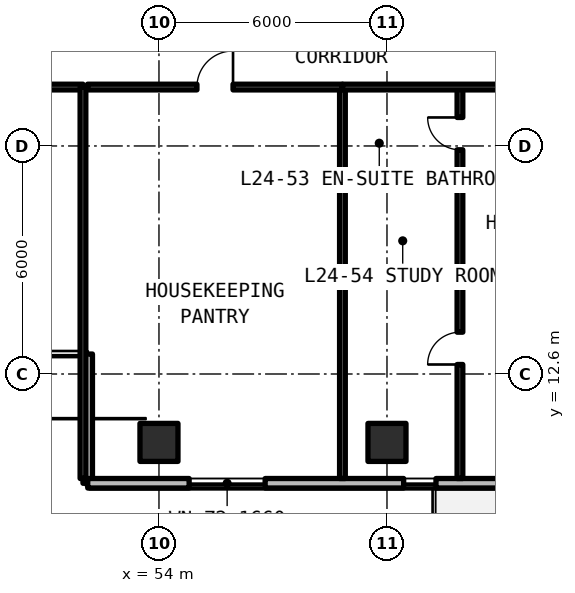
"""IFC4 building model, lengths in metres.
Left out: names, types, materials, properties, quantities, classifications, styles, units other than length and angle.
Written with IfcOpenShell. Run it as: python <this file> out.ifc"""

import sys

from ifc_helpers import new_model, si_unit, direction, frame, frame_2d, origin, origin_2d, place, context, subcontext, project, spatial, rectangle, extrude, element, fill, save


model = new_model("IFC4")
c1 = context("Model", 3, precision=1e-05, world=origin(), true_north=direction((0.0, 1.0)))
c2 = subcontext(c1, "Body", "Model", "MODEL_VIEW")
j1 = project(units=[si_unit("LENGTHUNIT", "METRE"), si_unit("PLANEANGLEUNIT", "RADIAN")], contexts=[c1])
p1 = place(None, origin())
s1 = spatial("IfcSite", under=j1, at=p1, CompositionType="ELEMENT")
p2 = place(p1, origin())
s2 = spatial("IfcBuilding", under=s1, at=p2, CompositionType="ELEMENT")
p3 = place(p2, frame((0.0, 0.0, 88.77)))
s3 = spatial("IfcBuildingStorey", under=s2, at=p3, CompositionType="ELEMENT", Elevation=88.77)
for number, where, z_axis, x_axis in (
    (1, (54.0, 10.8, 0.0), (0.0, 0.0, 1.0), (1.0, 0.0, 0.0)),
    (2, (60.0, 10.8, 0.0), (0.0, 0.0, 1.0), (1.0, 0.0, 0.0)),
):
    element("IfcColumn", number, at=place(p3, frame(where, z_axis=z_axis, x_axis=x_axis)), inside=s3, PredefinedType="COLUMN", context=c2, shape_type="SweptSolid", body=[
        extrude(rectangle(XDim=1.0, YDim=1.0, at=origin_2d()), origin(), (0.0, 0.0, 1.0), 3.3),
    ])
p4 = place(p3, frame((52.125, 13.125, 0.0), z_axis=(0.0, 0.0, 1.0), x_axis=(0.0, -1.0, 0.0)))
e3 = element("IfcWall", 3, at=p4, inside=s3, PredefinedType="SOLIDWALL", context=c2, shape_type="SweptSolid", body=[
    extrude(rectangle(XDim=3.4, YDim=0.25, at=frame_2d((1.7, 0.0))), origin(), (0.0, 0.0, 1.0), 3.08),
])
p5 = place(p3, frame((52.125, 9.725, 0.0), z_axis=(0.0, 0.0, 1.0), x_axis=(1.0, 0.0, 0.0)))
e4 = element("IfcWall", 4, at=p5, inside=s3, PredefinedType="SOLIDWALL", context=c2, shape_type="SweptSolid", body=[
    extrude(rectangle(XDim=44.023, YDim=0.25, at=frame_2d((22.012, 0.0))), origin(), (0.0, 0.0, 1.0), 3.08),
])
p6 = place(p5, frame((10.875, 0.0, 0.0)))
e5 = element("IfcOpeningElement", 5, at=p6, cuts=e4, PredefinedType="OPENING", context=c2, shape_type="SweptSolid", body=[
    extrude(rectangle(XDim=1.1, YDim=2.15, at=frame_2d((0.55, 1.075))), frame((0.0, 0.135, 0.0), z_axis=(0.0, -1.0, 0.0), x_axis=(1.0, 0.0, 0.0)), (0.0, 0.0, 1.0), 0.27),
])
p7 = place(p5, frame((22.975, 0.0, 0.0)))
e6 = element("IfcOpeningElement", 6, at=p7, cuts=e4, PredefinedType="OPENING", context=c2, shape_type="SweptSolid", body=[
    extrude(rectangle(XDim=1.1, YDim=2.15, at=frame_2d((0.55, 1.075))), frame((0.0, 0.135, 0.0), z_axis=(0.0, -1.0, 0.0), x_axis=(1.0, 0.0, 0.0)), (0.0, 0.0, 1.0), 0.27),
])
p8 = place(p5, frame((35.075, 0.0, 0.0)))
e7 = element("IfcOpeningElement", 7, at=p8, cuts=e4, PredefinedType="OPENING", context=c2, shape_type="SweptSolid", body=[
    extrude(rectangle(XDim=1.1, YDim=2.15, at=frame_2d((0.55, 1.075))), frame((0.0, 0.135, 0.0), z_axis=(0.0, -1.0, 0.0), x_axis=(1.0, 0.0, 0.0)), (0.0, 0.0, 1.0), 0.27),
])
p9 = place(p5, frame((2.669, 0.0, 0.78)))
e8 = element("IfcOpeningElement", 8, at=p9, cuts=e4, PredefinedType="OPENING", context=c2, shape_type="SweptSolid", body=[
    extrude(rectangle(XDim=2.0, YDim=1.66, at=frame_2d((1.0, 0.83))), frame((0.0, 0.135, 0.0), z_axis=(0.0, -1.0, 0.0), x_axis=(1.0, 0.0, 0.0)), (0.0, 0.0, 1.0), 0.27),
])
p10 = place(p5, frame((8.314, 0.0, 0.78)))
e9 = element("IfcOpeningElement", 9, at=p10, cuts=e4, PredefinedType="OPENING", context=c2, shape_type="SweptSolid", body=[
    extrude(rectangle(XDim=0.85, YDim=1.65, at=frame_2d((0.425, 0.825))), frame((0.0, 0.135, 0.0), z_axis=(0.0, -1.0, 0.0), x_axis=(1.0, 0.0, 0.0)), (0.0, 0.0, 1.0), 0.27),
])
p11 = place(p5, frame((27.363, 0.0, 0.78)))
e10 = element("IfcOpeningElement", 10, at=p11, cuts=e4, PredefinedType="OPENING", context=c2, shape_type="SweptSolid", body=[
    extrude(rectangle(XDim=2.0, YDim=1.66, at=frame_2d((1.0, 0.83))), frame((0.0, 0.135, 0.0), z_axis=(0.0, -1.0, 0.0), x_axis=(1.0, 0.0, 0.0)), (0.0, 0.0, 1.0), 0.27),
])
p12 = place(p5, frame((40.048, 0.0, 0.78)))
e11 = element("IfcOpeningElement", 11, at=p12, cuts=e4, PredefinedType="OPENING", context=c2, shape_type="SweptSolid", body=[
    extrude(rectangle(XDim=2.0, YDim=1.66, at=frame_2d((1.0, 0.83))), frame((0.0, 0.135, 0.0), z_axis=(0.0, -1.0, 0.0), x_axis=(1.0, 0.0, 0.0)), (0.0, 0.0, 1.0), 0.27),
])
p13 = place(p3, frame((43.6, 20.15, 0.0), z_axis=(0.0, 0.0, 1.0), x_axis=(1.0, 0.0, 0.0)))
e12 = element("IfcWall", 12, at=p13, inside=s3, PredefinedType="SOLIDWALL", context=c2, shape_type="SweptSolid", body=[
    extrude(rectangle(XDim=8.4, YDim=0.15, at=frame_2d((4.2, 0.0))), origin(), (0.0, 0.0, 1.0), 2.35),
])
p14 = place(p13, frame((3.65, 0.0, 0.0)))
e13 = element("IfcOpeningElement", 13, at=p14, cuts=e12, PredefinedType="OPENING", context=c2, shape_type="SweptSolid", body=[
    extrude(rectangle(XDim=1.1, YDim=2.15, at=frame_2d((0.55, 1.075))), frame((0.0, 0.085, 0.0), z_axis=(0.0, -1.0, 0.0), x_axis=(1.0, 0.0, 0.0)), (0.0, 0.0, 1.0), 0.17),
])
for number, where, z_axis, x_axis in (
    (14, (52.0, 9.85, 0.0), (0.0, 0.0, 1.0), (0.0, 1.0, 0.0)),
    (15, (58.828, 9.85, 0.0), (0.0, 0.0, 1.0), (0.0, 1.0, 0.0)),
):
    element("IfcWall", number, at=place(p3, frame(where, z_axis=z_axis, x_axis=x_axis)), inside=s3, PredefinedType="SOLIDWALL", context=c2, shape_type="SweptSolid", body=[
        extrude(rectangle(XDim=10.3, YDim=0.15, at=frame_2d((5.15, 0.0))), origin(), (0.0, 0.0, 1.0), 2.35),
    ])
p15 = place(p3, frame((52.12, 20.15, 0.0), z_axis=(0.0, 0.0, 1.0), x_axis=(1.0, 0.0, 0.0)))
e16 = element("IfcWall", 16, at=p15, inside=s3, PredefinedType="SOLIDWALL", context=c2, shape_type="SweptSolid", body=[
    extrude(rectangle(XDim=6.708, YDim=0.15, at=frame_2d((3.354, 0.0))), origin(), (0.0, 0.0, 1.0), 2.35),
])
p16 = place(p15, frame((2.879, 0.0, 0.0)))
e17 = element("IfcOpeningElement", 17, at=p16, cuts=e16, PredefinedType="OPENING", context=c2, shape_type="SweptSolid", body=[
    extrude(rectangle(XDim=0.95, YDim=2.15, at=frame_2d((0.475, 1.075))), frame((0.0, 0.085, 0.0), z_axis=(0.0, -1.0, 0.0), x_axis=(1.0, 0.0, 0.0)), (0.0, 0.0, 1.0), 0.17),
])
p17 = place(p3, frame((58.828, 17.7, 0.0), z_axis=(0.0, 0.0, 1.0), x_axis=(1.0, 0.0, 0.0)))
e18 = element("IfcWall", 18, at=p17, inside=s3, PredefinedType="PARTITIONING", context=c2, shape_type="SweptSolid", body=[
    extrude(rectangle(XDim=3.092, YDim=0.15, at=frame_2d((1.546, 0.0))), origin(), (0.0, 0.0, 1.0), 2.35),
])
p18 = place(p3, frame((61.92, 9.85, 0.0), z_axis=(0.0, 0.0, 1.0), x_axis=(0.0, 1.0, 0.0)))
e19 = element("IfcWall", 19, at=p18, inside=s3, PredefinedType="PARTITIONING", context=c2, shape_type="SweptSolid", body=[
    extrude(rectangle(XDim=10.3, YDim=0.15, at=frame_2d((5.15, 0.0))), origin(), (0.0, 0.0, 1.0), 2.35),
])
p19 = place(p18, frame((3.0, 0.0, 0.0)))
e20 = element("IfcOpeningElement", 20, at=p19, cuts=e19, PredefinedType="OPENING", context=c2, shape_type="SweptSolid", body=[
    extrude(rectangle(XDim=0.85, YDim=2.1, at=frame_2d((0.425, 1.05))), frame((0.0, 0.085, 0.0), z_axis=(0.0, -1.0, 0.0), x_axis=(1.0, 0.0, 0.0)), (0.0, 0.0, 1.0), 0.17),
])
p20 = place(p18, frame((8.65, 0.0, 0.0)))
e21 = element("IfcOpeningElement", 21, at=p20, cuts=e19, PredefinedType="OPENING", context=c2, shape_type="SweptSolid", body=[
    extrude(rectangle(XDim=0.85, YDim=2.1, at=frame_2d((0.425, 1.05))), frame((0.0, 0.085, 0.0), z_axis=(0.0, -1.0, 0.0), x_axis=(1.0, 0.0, 0.0)), (0.0, 0.0, 1.0), 0.17),
])
p21 = place(p3, frame((58.828, 20.15, 0.0), z_axis=(0.0, 0.0, 1.0), x_axis=(1.0, 0.0, 0.0)))
e22 = element("IfcWall", 22, at=p21, inside=s3, PredefinedType="SOLIDWALL", context=c2, shape_type="SweptSolid", body=[
    extrude(rectangle(XDim=7.826, YDim=0.15, at=frame_2d((3.913, 0.0))), origin(), (0.0, 0.0, 1.0), 2.35),
])
p22 = place(p21, frame((5.024, 0.0, 0.0)))
e23 = element("IfcOpeningElement", 23, at=p22, cuts=e22, PredefinedType="OPENING", context=c2, shape_type="SweptSolid", body=[
    extrude(rectangle(XDim=0.95, YDim=2.15, at=frame_2d((0.475, 1.075))), frame((0.0, 0.085, 0.0), z_axis=(0.0, -1.0, 0.0), x_axis=(1.0, 0.0, 0.0)), (0.0, 0.0, 1.0), 0.17),
])
p23 = place(p9, origin())
e24 = element("IfcWindow", 24, at=p23, inside=s3, PartitioningType="SINGLE_PANEL", PredefinedType="WINDOW", context=c2, shape_type="SweptSolid", body=[
    extrude(rectangle(XDim=2.0, YDim=1.66, at=frame_2d((1.0, 0.83))), frame((0.0, 0.03, 0.0), z_axis=(0.0, -1.0, 0.0), x_axis=(1.0, 0.0, 0.0)), (0.0, 0.0, 1.0), 0.06),
])
fill(e8, e24)
p24 = place(p10, origin())
e25 = element("IfcWindow", 25, at=p24, inside=s3, PartitioningType="SINGLE_PANEL", PredefinedType="WINDOW", context=c2, shape_type="SweptSolid", body=[
    extrude(rectangle(XDim=0.85, YDim=1.65, at=frame_2d((0.425, 0.825))), frame((0.0, 0.03, 0.0), z_axis=(0.0, -1.0, 0.0), x_axis=(1.0, 0.0, 0.0)), (0.0, 0.0, 1.0), 0.06),
])
fill(e9, e25)
p25 = place(p16, origin())
e26 = element("IfcDoor", 26, at=p25, inside=s3, OperationType="SINGLE_SWING_RIGHT", PredefinedType="DOOR", context=c2, shape_type="SweptSolid", body=[
    extrude(rectangle(XDim=0.95, YDim=2.15, at=frame_2d((0.475, 1.075))), frame((0.0, 0.025, 0.0), z_axis=(0.0, -1.0, 0.0), x_axis=(1.0, 0.0, 0.0)), (0.0, 0.0, 1.0), 0.05),
])
fill(e17, e26)
p26 = place(p19, origin())
e27 = element("IfcDoor", 27, at=p26, inside=s3, OperationType="SINGLE_SWING_LEFT", PredefinedType="DOOR", context=c2, shape_type="SweptSolid", body=[
    extrude(rectangle(XDim=0.85, YDim=2.1, at=frame_2d((0.425, 1.05))), frame((0.0, 0.025, 0.0), z_axis=(0.0, -1.0, 0.0), x_axis=(1.0, 0.0, 0.0)), (0.0, 0.0, 1.0), 0.05),
])
fill(e20, e27)
p27 = place(p20, origin())
e28 = element("IfcDoor", 28, at=p27, inside=s3, OperationType="SINGLE_SWING_RIGHT", PredefinedType="DOOR", context=c2, shape_type="SweptSolid", body=[
    extrude(rectangle(XDim=0.85, YDim=2.1, at=frame_2d((0.425, 1.05))), frame((0.0, 0.025, 0.0), z_axis=(0.0, -1.0, 0.0), x_axis=(1.0, 0.0, 0.0)), (0.0, 0.0, 1.0), 0.05),
])
fill(e21, e28)
save(model, sys.argv[1])
